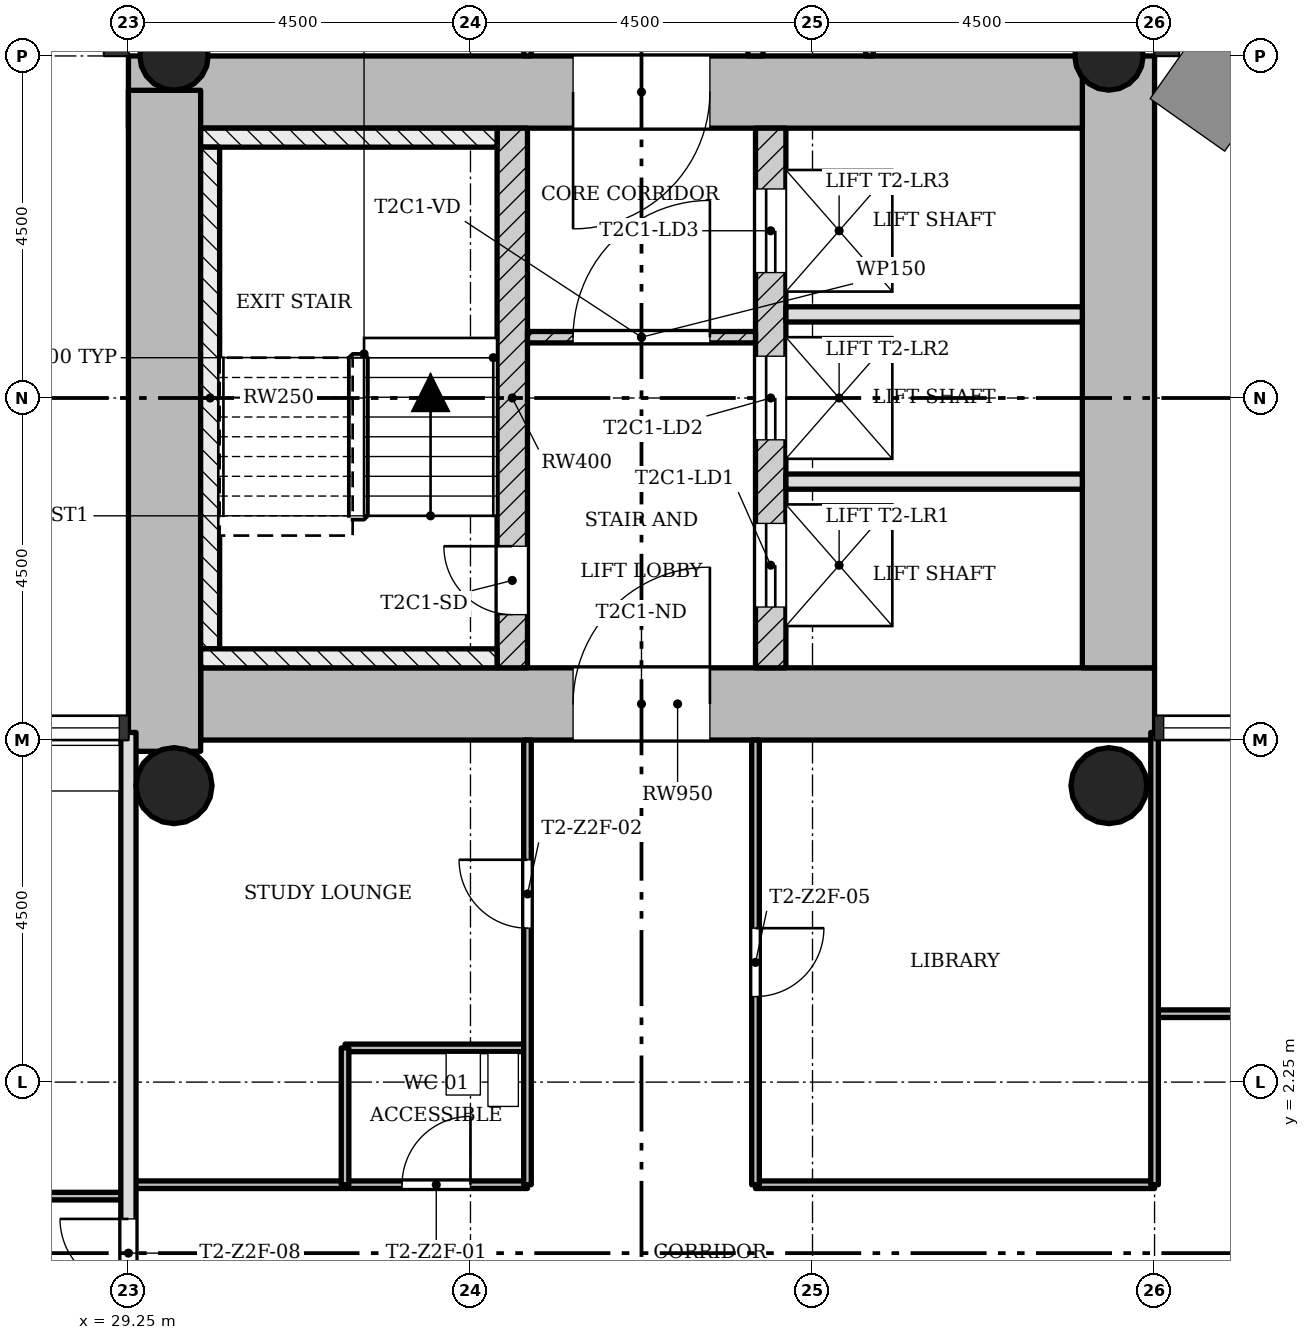
"""IFC4 building model, lengths in metres.
Left out: names, types, materials, properties, quantities, classifications, styles, units other than length and angle.
Written with IfcOpenShell. Run it as: python <this file> out.ifc"""

import sys

from ifc_helpers import new_model, si_unit, direction, frame, frame_2d, origin, origin_2d, place, context, subcontext, project, spatial, rectangle, hollow_circle, extrude, element, fill, save


model = new_model("IFC4")
c1 = context("Model", 3, precision=1e-05, world=origin(), true_north=direction((0.0, 1.0)))
c2 = subcontext(c1, "Body", "Model", "MODEL_VIEW")
j1 = project(units=[si_unit("LENGTHUNIT", "METRE"), si_unit("PLANEANGLEUNIT", "RADIAN")], contexts=[c1])
p1 = place(None, origin())
s1 = spatial("IfcSite", under=j1, at=p1, CompositionType="ELEMENT")
p2 = place(p1, origin())
s2 = spatial("IfcBuilding", under=s1, at=p2, CompositionType="ELEMENT")
p3 = place(p2, frame((0.0, 0.0, 107.2)))
s3 = spatial("IfcBuildingStorey", under=s2, at=p3, CompositionType="ELEMENT", Elevation=107.2)
p4 = place(p3, frame((30.2, 7.225, 0.0), z_axis=(0.0, 0.0, 1.0), x_axis=(1.0, 0.0, 0.0)))
e1 = element("IfcWall", 1, at=p4, inside=s3, PredefinedType="SHEAR", context=c2, shape_type="SweptSolid", body=[
    extrude(rectangle(XDim=12.55, YDim=0.95, at=frame_2d((6.275, 0.0))), origin(), (0.0, 0.0, 1.0), 3.4),
])
p5 = place(p4, frame((4.9, 0.0, 0.0)))
e2 = element("IfcOpeningElement", 2, at=p5, cuts=e1, PredefinedType="OPENING", context=c2, shape_type="SweptSolid", body=[
    extrude(rectangle(XDim=1.8, YDim=2.1, at=frame_2d((0.9, 1.05))), frame((0.0, 0.485, 0.0), z_axis=(0.0, -1.0, 0.0), x_axis=(1.0, 0.0, 0.0)), (0.0, 0.0, 1.0), 0.97),
])
p6 = place(p3, frame((42.275, 7.7, 0.0), z_axis=(0.0, 0.0, 1.0), x_axis=(0.0, 1.0, 0.0)))
e3 = element("IfcWall", 3, at=p6, inside=s3, PredefinedType="SHEAR", context=c2, shape_type="SweptSolid", body=[
    extrude(rectangle(XDim=8.05, YDim=0.95, at=frame_2d((4.025, 0.0))), origin(), (0.0, 0.0, 1.0), 3.4),
])
p7 = place(p3, frame((41.8, 15.275, 0.0), z_axis=(0.0, 0.0, 1.0), x_axis=(-1.0, 0.0, 0.0)))
e4 = element("IfcWall", 4, at=p7, inside=s3, PredefinedType="SHEAR", context=c2, shape_type="SweptSolid", body=[
    extrude(rectangle(XDim=12.55, YDim=0.95, at=frame_2d((6.275, 0.0))), origin(), (0.0, 0.0, 1.0), 3.4),
])
p8 = place(p7, frame((4.9, 0.0, 0.0)))
e5 = element("IfcOpeningElement", 5, at=p8, cuts=e4, PredefinedType="OPENING", context=c2, shape_type="SweptSolid", body=[
    extrude(rectangle(XDim=1.8, YDim=2.1, at=frame_2d((0.9, 1.05))), frame((0.0, 0.485, 0.0), z_axis=(0.0, -1.0, 0.0), x_axis=(1.0, 0.0, 0.0)), (0.0, 0.0, 1.0), 0.97),
])
p9 = place(p3, frame((29.725, 15.298, 0.0), z_axis=(0.0, 0.0, 1.0), x_axis=(0.0, -1.0, 0.0)))
e6 = element("IfcWall", 6, at=p9, inside=s3, PredefinedType="SHEAR", context=c2, shape_type="SweptSolid", body=[
    extrude(rectangle(XDim=8.696, YDim=0.95, at=frame_2d((4.348, 0.0))), origin(), (0.0, 0.0, 1.0), 3.4),
])
p10 = place(p3, frame((34.3, 7.7, 0.0), z_axis=(0.0, 0.0, 1.0), x_axis=(0.0, 1.0, 0.0)))
e7 = element("IfcWall", 7, at=p10, inside=s3, PredefinedType="SHEAR", context=c2, shape_type="SweptSolid", body=[
    extrude(rectangle(XDim=7.1, YDim=0.4, at=frame_2d((3.55, 0.0))), origin(), (0.0, 0.0, 1.0), 3.4),
])
p11 = place(p10, frame((0.7, 0.0, 0.0)))
e8 = element("IfcOpeningElement", 8, at=p11, cuts=e7, PredefinedType="OPENING", context=c2, shape_type="SweptSolid", body=[
    extrude(rectangle(XDim=0.9, YDim=2.1, at=frame_2d((0.45, 1.05))), frame((0.0, 0.21, 0.0), z_axis=(0.0, -1.0, 0.0), x_axis=(1.0, 0.0, 0.0)), (0.0, 0.0, 1.0), 0.42),
])
p12 = place(p3, frame((37.7, 7.7, 0.0), z_axis=(0.0, 0.0, 1.0), x_axis=(0.0, 1.0, 0.0)))
e9 = element("IfcWall", 9, at=p12, inside=s3, PredefinedType="SHEAR", context=c2, shape_type="SweptSolid", body=[
    extrude(rectangle(XDim=7.1, YDim=0.4, at=frame_2d((3.55, 0.0))), origin(), (0.0, 0.0, 1.0), 3.4),
])
p13 = place(p12, frame((0.8, 0.0, 0.0)))
e10 = element("IfcOpeningElement", 10, at=p13, cuts=e9, PredefinedType="OPENING", context=c2, shape_type="SweptSolid", body=[
    extrude(rectangle(XDim=1.1, YDim=2.1, at=frame_2d((0.55, 1.05))), frame((0.0, 0.21, 0.0), z_axis=(0.0, -1.0, 0.0), x_axis=(1.0, 0.0, 0.0)), (0.0, 0.0, 1.0), 0.42),
])
p14 = place(p12, frame((3.0, 0.0, 0.0)))
e11 = element("IfcOpeningElement", 11, at=p14, cuts=e9, PredefinedType="OPENING", context=c2, shape_type="SweptSolid", body=[
    extrude(rectangle(XDim=1.1, YDim=2.1, at=frame_2d((0.55, 1.05))), frame((0.0, 0.21, 0.0), z_axis=(0.0, -1.0, 0.0), x_axis=(1.0, 0.0, 0.0)), (0.0, 0.0, 1.0), 0.42),
])
p15 = place(p12, frame((5.2, 0.0, 0.0)))
e12 = element("IfcOpeningElement", 12, at=p15, cuts=e9, PredefinedType="OPENING", context=c2, shape_type="SweptSolid", body=[
    extrude(rectangle(XDim=1.1, YDim=2.1, at=frame_2d((0.55, 1.05))), frame((0.0, 0.21, 0.0), z_axis=(0.0, -1.0, 0.0), x_axis=(1.0, 0.0, 0.0)), (0.0, 0.0, 1.0), 0.42),
])
for number, where, z_axis, x_axis in (
    (13, (42.15, 15.75, 0.0), (0.0, 0.0, 1.0), (1.0, 0.0, 0.0)),
    (14, (29.85, 15.75, 0.0), (0.0, 0.0, 1.0), (1.0, 0.0, 0.0)),
):
    element("IfcColumn", number, at=place(p3, frame(where, z_axis=z_axis, x_axis=x_axis)), inside=s3, PredefinedType="COLUMN", context=c2, shape_type="SweptSolid", body=[
        extrude(hollow_circle(Radius=0.45, WallThickness=0.032, at=origin_2d()), origin(), (0.0, 0.0, 1.0), 3.4),
    ])
for number, where, z_axis, x_axis in (
    (15, (42.15, 6.15, 0.0), (0.0, 0.0, 1.0), (1.0, 0.0, 0.0)),
    (16, (29.85, 6.15, 0.0), (0.0, 0.0, 1.0), (1.0, 0.0, 0.0)),
):
    element("IfcColumn", number, at=place(p3, frame(where, z_axis=z_axis, x_axis=x_axis)), inside=s3, PredefinedType="COLUMN", context=c2, shape_type="SweptSolid", body=[
        extrude(hollow_circle(Radius=0.5, WallThickness=0.036, at=origin_2d()), origin(), (0.0, 0.0, 1.0), 3.4),
    ])
p16 = place(p3, frame((37.5, 12.05, 0.0), z_axis=(0.0, 0.0, 1.0), x_axis=(-1.0, 0.0, 0.0)))
e17 = element("IfcWall", 17, at=p16, inside=s3, PredefinedType="PARTITIONING", context=c2, shape_type="SweptSolid", body=[
    extrude(rectangle(XDim=3.0, YDim=0.15, at=frame_2d((1.5, 0.0))), origin(), (0.0, 0.0, 1.0), 3.0),
])
p17 = place(p16, frame((0.6, 0.0, 0.0)))
e18 = element("IfcOpeningElement", 18, at=p17, cuts=e17, PredefinedType="OPENING", context=c2, shape_type="SweptSolid", body=[
    extrude(rectangle(XDim=1.8, YDim=2.1, at=frame_2d((0.9, 1.05))), frame((0.0, 0.085, 0.0), z_axis=(0.0, -1.0, 0.0), x_axis=(1.0, 0.0, 0.0)), (0.0, 0.0, 1.0), 0.17),
])
for number, where, z_axis, x_axis in (
    (19, (41.8, 10.15, 0.0), (0.0, 0.0, 1.0), (-1.0, 0.0, 0.0)),
    (20, (41.8, 12.35, 0.0), (0.0, 0.0, 1.0), (-1.0, 0.0, 0.0)),
):
    element("IfcWall", number, at=place(p3, frame(where, z_axis=z_axis, x_axis=x_axis)), inside=s3, PredefinedType="SOLIDWALL", context=c2, shape_type="SweptSolid", body=[
        extrude(rectangle(XDim=3.9, YDim=0.2, at=frame_2d((1.95, 0.0))), origin(), (0.0, 0.0, 1.0), 3.0),
    ])
p18 = place(p3, frame((29.25, 0.75, 0.0), z_axis=(0.0, 0.0, 1.0), x_axis=(-1.0, 0.0, 0.0)))
e21 = element("IfcWall", 21, at=p18, inside=s3, PredefinedType="PARTITIONING", context=c2, shape_type="SweptSolid", body=[
    extrude(rectangle(XDim=7.8, YDim=0.1, at=frame_2d((3.9, 0.0))), origin(), (0.0, 0.0, 1.0), 3.0),
])
p19 = place(p18, frame((1.8, 0.0, 0.0)))
e22 = element("IfcOpeningElement", 22, at=p19, cuts=e21, PredefinedType="OPENING", context=c2, shape_type="SweptSolid", body=[
    extrude(rectangle(XDim=0.9, YDim=2.1, at=frame_2d((0.45, 1.05))), frame((0.0, 0.06, 0.0), z_axis=(0.0, -1.0, 0.0), x_axis=(1.0, 0.0, 0.0)), (0.0, 0.0, 1.0), 0.12),
])
p20 = place(p18, frame((4.95, 0.0, 0.0)))
e23 = element("IfcOpeningElement", 23, at=p20, cuts=e21, PredefinedType="OPENING", context=c2, shape_type="SweptSolid", body=[
    extrude(rectangle(XDim=0.9, YDim=2.1, at=frame_2d((0.45, 1.05))), frame((0.0, 0.06, 0.0), z_axis=(0.0, -1.0, 0.0), x_axis=(1.0, 0.0, 0.0)), (0.0, 0.0, 1.0), 0.12),
])
p21 = place(p18, frame((6.6, 0.0, 0.0)))
e24 = element("IfcOpeningElement", 24, at=p21, cuts=e21, PredefinedType="OPENING", context=c2, shape_type="SweptSolid", body=[
    extrude(rectangle(XDim=0.9, YDim=2.1, at=frame_2d((0.45, 1.05))), frame((0.0, 0.06, 0.0), z_axis=(0.0, -1.0, 0.0), x_axis=(1.0, 0.0, 0.0)), (0.0, 0.0, 1.0), 0.12),
])
p22 = place(p3, frame((42.75, 0.9, 0.0), z_axis=(0.0, 0.0, 1.0), x_axis=(-1.0, 0.0, 0.0)))
e25 = element("IfcWall", 25, at=p22, inside=s3, PredefinedType="PARTITIONING", context=c2, shape_type="SweptSolid", body=[
    extrude(rectangle(XDim=5.25, YDim=0.1, at=frame_2d((2.625, 0.0))), origin(), (0.0, 0.0, 1.0), 3.0),
])
p23 = place(p3, frame((34.5, 0.9, 0.0), z_axis=(0.0, 0.0, 1.0), x_axis=(-1.0, 0.0, 0.0)))
e26 = element("IfcWall", 26, at=p23, inside=s3, PredefinedType="PARTITIONING", context=c2, shape_type="SweptSolid", body=[
    extrude(rectangle(XDim=5.25, YDim=0.1, at=frame_2d((2.625, 0.0))), origin(), (0.0, 0.0, 1.0), 3.0),
])
p24 = place(p23, frame((0.75, 0.0, 0.0)))
e27 = element("IfcOpeningElement", 27, at=p24, cuts=e26, PredefinedType="OPENING", context=c2, shape_type="SweptSolid", body=[
    extrude(rectangle(XDim=0.9, YDim=2.1, at=frame_2d((0.45, 1.05))), frame((0.0, 0.06, 0.0), z_axis=(0.0, -1.0, 0.0), x_axis=(1.0, 0.0, 0.0)), (0.0, 0.0, 1.0), 0.12),
])
p25 = place(p3, frame((34.5, 2.7, 0.0), z_axis=(0.0, 0.0, 1.0), x_axis=(-1.0, 0.0, 0.0)))
e28 = element("IfcWall", 28, at=p25, inside=s3, PredefinedType="PARTITIONING", context=c2, shape_type="SweptSolid", body=[
    extrude(rectangle(XDim=2.4, YDim=0.1, at=frame_2d((1.2, 0.0))), origin(), (0.0, 0.0, 1.0), 3.0),
])
p26 = place(p3, frame((51.75, 3.15, 0.0), z_axis=(0.0, 0.0, 1.0), x_axis=(-1.0, 0.0, 0.0)))
e29 = element("IfcWall", 29, at=p26, inside=s3, PredefinedType="PARTITIONING", context=c2, shape_type="SweptSolid", body=[
    extrude(rectangle(XDim=9.0, YDim=0.1, at=frame_2d((4.5, 0.0))), origin(), (0.0, 0.0, 1.0), 3.0),
])
p27 = place(p26, frame((5.55, 0.0, 0.0)))
e30 = element("IfcOpeningElement", 30, at=p27, cuts=e29, PredefinedType="OPENING", context=c2, shape_type="SweptSolid", body=[
    extrude(rectangle(XDim=0.9, YDim=2.1, at=frame_2d((0.45, 1.05))), frame((0.0, 0.06, 0.0), z_axis=(0.0, -1.0, 0.0), x_axis=(1.0, 0.0, 0.0)), (0.0, 0.0, 1.0), 0.12),
])
p28 = place(p3, frame((42.75, 0.9, 0.0), z_axis=(0.0, 0.0, 1.0), x_axis=(0.0, 1.0, 0.0)))
e31 = element("IfcWall", 31, at=p28, inside=s3, PredefinedType="PARTITIONING", context=c2, shape_type="SweptSolid", body=[
    extrude(rectangle(XDim=5.95, YDim=0.1, at=frame_2d((2.975, 0.0))), origin(), (0.0, 0.0, 1.0), 3.0),
])
p29 = place(p3, frame((39.0, 15.75, 0.0), z_axis=(0.0, 0.0, 1.0), x_axis=(0.0, 1.0, 0.0)))
e32 = element("IfcWall", 32, at=p29, inside=s3, PredefinedType="PARTITIONING", context=c2, shape_type="SweptSolid", body=[
    extrude(rectangle(XDim=2.4, YDim=0.1, at=frame_2d((1.2, 0.0))), origin(), (0.0, 0.0, 1.0), 3.0),
])
p30 = place(p29, frame((0.75, 0.0, 0.0)))
e33 = element("IfcOpeningElement", 33, at=p30, cuts=e32, PredefinedType="OPENING", context=c2, shape_type="SweptSolid", body=[
    extrude(rectangle(XDim=0.9, YDim=2.1, at=frame_2d((0.45, 1.05))), frame((0.0, 0.06, 0.0), z_axis=(0.0, -1.0, 0.0), x_axis=(1.0, 0.0, 0.0)), (0.0, 0.0, 1.0), 0.12),
])
p31 = place(p3, frame((37.5, 0.9, 0.0), z_axis=(0.0, 0.0, 1.0), x_axis=(0.0, 1.0, 0.0)))
e34 = element("IfcWall", 34, at=p31, inside=s3, PredefinedType="PARTITIONING", context=c2, shape_type="SweptSolid", body=[
    extrude(rectangle(XDim=5.85, YDim=0.1, at=frame_2d((2.925, 0.0))), origin(), (0.0, 0.0, 1.0), 3.0),
])
p32 = place(p31, frame((2.475, 0.0, 0.0)))
e35 = element("IfcOpeningElement", 35, at=p32, cuts=e34, PredefinedType="OPENING", context=c2, shape_type="SweptSolid", body=[
    extrude(rectangle(XDim=0.9, YDim=2.1, at=frame_2d((0.45, 1.05))), frame((0.0, 0.06, 0.0), z_axis=(0.0, -1.0, 0.0), x_axis=(1.0, 0.0, 0.0)), (0.0, 0.0, 1.0), 0.12),
])
p33 = place(p3, frame((37.5, 15.75, 0.0), z_axis=(0.0, 0.0, 1.0), x_axis=(0.0, 1.0, 0.0)))
e36 = element("IfcWall", 36, at=p33, inside=s3, PredefinedType="SOLIDWALL", context=c2, shape_type="SweptSolid", body=[
    extrude(rectangle(XDim=4.5, YDim=0.2, at=frame_2d((2.25, 0.0))), origin(), (0.0, 0.0, 1.0), 3.0),
])
p34 = place(p33, frame((3.0, 0.0, 0.0)))
e37 = element("IfcOpeningElement", 37, at=p34, cuts=e36, PredefinedType="OPENING", context=c2, shape_type="SweptSolid", body=[
    extrude(rectangle(XDim=0.9, YDim=2.1, at=frame_2d((0.45, 1.05))), frame((0.0, 0.11, 0.0), z_axis=(0.0, -1.0, 0.0), x_axis=(1.0, 0.0, 0.0)), (0.0, 0.0, 1.0), 0.22),
])
p35 = place(p3, frame((34.5, 0.9, 0.0), z_axis=(0.0, 0.0, 1.0), x_axis=(0.0, 1.0, 0.0)))
e38 = element("IfcWall", 38, at=p35, inside=s3, PredefinedType="PARTITIONING", context=c2, shape_type="SweptSolid", body=[
    extrude(rectangle(XDim=5.85, YDim=0.1, at=frame_2d((2.925, 0.0))), origin(), (0.0, 0.0, 1.0), 3.0),
])
p36 = place(p35, frame((3.375, 0.0, 0.0)))
e39 = element("IfcOpeningElement", 39, at=p36, cuts=e38, PredefinedType="OPENING", context=c2, shape_type="SweptSolid", body=[
    extrude(rectangle(XDim=0.9, YDim=2.1, at=frame_2d((0.45, 1.05))), frame((0.0, 0.06, 0.0), z_axis=(0.0, -1.0, 0.0), x_axis=(1.0, 0.0, 0.0)), (0.0, 0.0, 1.0), 0.12),
])
p37 = place(p3, frame((34.5, 15.75, 0.0), z_axis=(0.0, 0.0, 1.0), x_axis=(0.0, 1.0, 0.0)))
e40 = element("IfcWall", 40, at=p37, inside=s3, PredefinedType="PARTITIONING", context=c2, shape_type="SweptSolid", body=[
    extrude(rectangle(XDim=4.5, YDim=0.1, at=frame_2d((2.25, 0.0))), origin(), (0.0, 0.0, 1.0), 3.0),
])
p38 = place(p37, frame((1.8, 0.0, 0.0)))
e41 = element("IfcOpeningElement", 41, at=p38, cuts=e40, PredefinedType="OPENING", context=c2, shape_type="SweptSolid", body=[
    extrude(rectangle(XDim=0.9, YDim=2.1, at=frame_2d((0.45, 1.05))), frame((0.0, 0.06, 0.0), z_axis=(0.0, -1.0, 0.0), x_axis=(1.0, 0.0, 0.0)), (0.0, 0.0, 1.0), 0.12),
])
p39 = place(p3, frame((32.1, 0.9, 0.0), z_axis=(0.0, 0.0, 1.0), x_axis=(0.0, 1.0, 0.0)))
e42 = element("IfcWall", 42, at=p39, inside=s3, PredefinedType="PARTITIONING", context=c2, shape_type="SweptSolid", body=[
    extrude(rectangle(XDim=1.8, YDim=0.1, at=frame_2d((0.9, 0.0))), origin(), (0.0, 0.0, 1.0), 3.0),
])
p40 = place(p3, frame((29.25, -6.85, 0.0), z_axis=(0.0, 0.0, 1.0), x_axis=(0.0, 1.0, 0.0)))
e43 = element("IfcWall", 43, at=p40, inside=s3, PredefinedType="SOLIDWALL", context=c2, shape_type="SweptSolid", body=[
    extrude(rectangle(XDim=13.7, YDim=0.2, at=frame_2d((6.85, 0.0))), origin(), (0.0, 0.0, 1.0), 3.0),
])
p41 = place(p40, frame((6.4, 0.0, 0.0)))
e44 = element("IfcOpeningElement", 44, at=p41, cuts=e43, PredefinedType="OPENING", context=c2, shape_type="SweptSolid", body=[
    extrude(rectangle(XDim=0.9, YDim=2.1, at=frame_2d((0.45, 1.05))), frame((0.0, 0.11, 0.0), z_axis=(0.0, -1.0, 0.0), x_axis=(1.0, 0.0, 0.0)), (0.0, 0.0, 1.0), 0.22),
])
p42 = place(p3, frame((34.1, 14.675, 0.0), z_axis=(0.0, 0.0, 1.0), x_axis=(-1.0, 0.0, 0.0)))
e45 = element("IfcWall", 45, at=p42, inside=s3, PredefinedType="SHEAR", context=c2, shape_type="SweptSolid", body=[
    extrude(rectangle(XDim=3.9, YDim=0.25, at=frame_2d((1.95, 0.0))), origin(), (0.0, 0.0, 1.0), 3.4),
])
p43 = place(p3, frame((30.325, 7.95, 0.0), z_axis=(0.0, 0.0, 1.0), x_axis=(0.0, 1.0, 0.0)))
e46 = element("IfcWall", 46, at=p43, inside=s3, PredefinedType="SHEAR", context=c2, shape_type="SweptSolid", body=[
    extrude(rectangle(XDim=6.6, YDim=0.25, at=frame_2d((3.3, 0.0))), origin(), (0.0, 0.0, 1.0), 3.4),
])
p44 = place(p3, frame((34.1, 7.825, 0.0), z_axis=(0.0, 0.0, 1.0), x_axis=(-1.0, 0.0, 0.0)))
e47 = element("IfcWall", 47, at=p44, inside=s3, PredefinedType="SHEAR", context=c2, shape_type="SweptSolid", body=[
    extrude(rectangle(XDim=3.9, YDim=0.25, at=frame_2d((1.95, 0.0))), origin(), (0.0, 0.0, 1.0), 3.4),
])
p45 = place(p17, origin())
e48 = element("IfcDoor", 48, at=p45, inside=s3, OperationType="SINGLE_SWING_LEFT", PredefinedType="DOOR", context=c2, shape_type="SweptSolid", body=[
    extrude(rectangle(XDim=1.8, YDim=2.1, at=frame_2d((0.9, 1.05))), frame((0.0, 0.025, 0.0), z_axis=(0.0, -1.0, 0.0), x_axis=(1.0, 0.0, 0.0)), (0.0, 0.0, 1.0), 0.05),
])
fill(e18, e48)
p46 = place(p24, origin())
e49 = element("IfcDoor", 49, at=p46, inside=s3, OperationType="SINGLE_SWING_LEFT", PredefinedType="DOOR", context=c2, shape_type="SweptSolid", body=[
    extrude(rectangle(XDim=0.9, YDim=2.1, at=frame_2d((0.45, 1.05))), frame((0.0, 0.025, 0.0), z_axis=(0.0, -1.0, 0.0), x_axis=(1.0, 0.0, 0.0)), (0.0, 0.0, 1.0), 0.05),
])
fill(e27, e49)
p47 = place(p36, origin())
e50 = element("IfcDoor", 50, at=p47, inside=s3, OperationType="SINGLE_SWING_LEFT", PredefinedType="DOOR", context=c2, shape_type="SweptSolid", body=[
    extrude(rectangle(XDim=0.9, YDim=2.1, at=frame_2d((0.45, 1.05))), frame((0.0, 0.025, 0.0), z_axis=(0.0, -1.0, 0.0), x_axis=(1.0, 0.0, 0.0)), (0.0, 0.0, 1.0), 0.05),
])
fill(e39, e50)
p48 = place(p32, origin())
e51 = element("IfcDoor", 51, at=p48, inside=s3, OperationType="SINGLE_SWING_RIGHT", PredefinedType="DOOR", context=c2, shape_type="SweptSolid", body=[
    extrude(rectangle(XDim=0.9, YDim=2.1, at=frame_2d((0.45, 1.05))), frame((0.0, 0.025, 0.0), z_axis=(0.0, -1.0, 0.0), x_axis=(1.0, 0.0, 0.0)), (0.0, 0.0, 1.0), 0.05),
])
fill(e35, e51)
p49 = place(p41, origin())
e52 = element("IfcDoor", 52, at=p49, inside=s3, OperationType="SINGLE_SWING_LEFT", PredefinedType="DOOR", context=c2, shape_type="SweptSolid", body=[
    extrude(rectangle(XDim=0.9, YDim=2.1, at=frame_2d((0.45, 1.05))), frame((0.0, 0.025, 0.0), z_axis=(0.0, -1.0, 0.0), x_axis=(1.0, 0.0, 0.0)), (0.0, 0.0, 1.0), 0.05),
])
fill(e44, e52)
p50 = place(p11, origin())
e53 = element("IfcDoor", 53, at=p50, inside=s3, OperationType="SINGLE_SWING_LEFT", PredefinedType="DOOR", context=c2, shape_type="SweptSolid", body=[
    extrude(rectangle(XDim=0.9, YDim=2.1, at=frame_2d((0.45, 1.05))), frame((0.0, 0.025, 0.0), z_axis=(0.0, -1.0, 0.0), x_axis=(1.0, 0.0, 0.0)), (0.0, 0.0, 1.0), 0.05),
])
fill(e8, e53)
p51 = place(p13, origin())
e54 = element("IfcDoor", 54, at=p51, inside=s3, OperationType="SLIDING_TO_LEFT", PredefinedType="DOOR", context=c2, shape_type="SweptSolid", body=[
    extrude(rectangle(XDim=1.1, YDim=2.1, at=frame_2d((0.55, 1.05))), frame((0.0, 0.025, 0.0), z_axis=(0.0, -1.0, 0.0), x_axis=(1.0, 0.0, 0.0)), (0.0, 0.0, 1.0), 0.05),
])
fill(e10, e54)
p52 = place(p14, origin())
e55 = element("IfcDoor", 55, at=p52, inside=s3, OperationType="SLIDING_TO_LEFT", PredefinedType="DOOR", context=c2, shape_type="SweptSolid", body=[
    extrude(rectangle(XDim=1.1, YDim=2.1, at=frame_2d((0.55, 1.05))), frame((0.0, 0.025, 0.0), z_axis=(0.0, -1.0, 0.0), x_axis=(1.0, 0.0, 0.0)), (0.0, 0.0, 1.0), 0.05),
])
fill(e11, e55)
p53 = place(p15, origin())
e56 = element("IfcDoor", 56, at=p53, inside=s3, OperationType="SLIDING_TO_LEFT", PredefinedType="DOOR", context=c2, shape_type="SweptSolid", body=[
    extrude(rectangle(XDim=1.1, YDim=2.1, at=frame_2d((0.55, 1.05))), frame((0.0, 0.025, 0.0), z_axis=(0.0, -1.0, 0.0), x_axis=(1.0, 0.0, 0.0)), (0.0, 0.0, 1.0), 0.05),
])
fill(e12, e56)
p54 = place(p5, origin())
e57 = element("IfcDoor", 57, at=p54, inside=s3, OperationType="SINGLE_SWING_LEFT", PredefinedType="DOOR", context=c2, shape_type="SweptSolid", body=[
    extrude(rectangle(XDim=1.8, YDim=2.1, at=frame_2d((0.9, 1.05))), frame((0.0, 0.025, 0.0), z_axis=(0.0, -1.0, 0.0), x_axis=(1.0, 0.0, 0.0)), (0.0, 0.0, 1.0), 0.05),
])
fill(e2, e57)
p55 = place(p8, origin())
e58 = element("IfcDoor", 58, at=p55, inside=s3, OperationType="SINGLE_SWING_LEFT", PredefinedType="DOOR", context=c2, shape_type="SweptSolid", body=[
    extrude(rectangle(XDim=1.8, YDim=2.1, at=frame_2d((0.9, 1.05))), frame((0.0, 0.025, 0.0), z_axis=(0.0, -1.0, 0.0), x_axis=(1.0, 0.0, 0.0)), (0.0, 0.0, 1.0), 0.05),
])
fill(e5, e58)
save(model, sys.argv[1])
